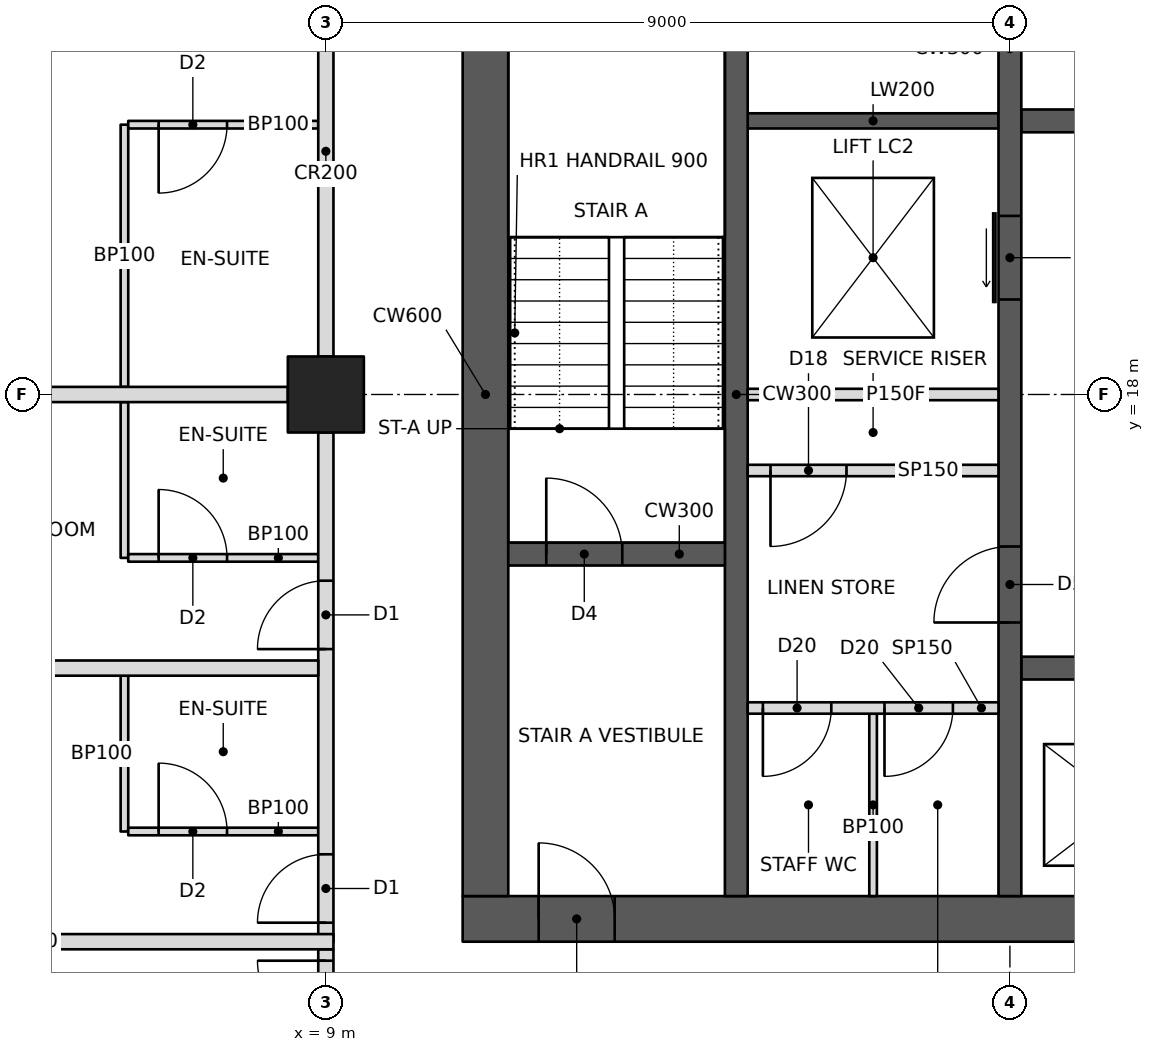
"""IFC4 building model, lengths in metres.
Left out: names, types, materials, properties, quantities, classifications, styles, units other than length and angle.
Written with IfcOpenShell. Run it as: python <this file> out.ifc"""

import sys

from ifc_helpers import new_model, si_unit, direction, frame, frame_2d, origin, origin_2d, place, context, subcontext, project, spatial, rectangle, hollow_rectangle, extrude, element, fill, save


model = new_model("IFC4")
c1 = context("Model", 3, precision=1e-05, world=origin(), true_north=direction((0.0, 1.0)))
c2 = subcontext(c1, "Body", "Model", "MODEL_VIEW")
j1 = project(units=[si_unit("LENGTHUNIT", "METRE"), si_unit("PLANEANGLEUNIT", "RADIAN")], contexts=[c1])
p1 = place(None, origin())
s1 = spatial("IfcSite", under=j1, at=p1, CompositionType="ELEMENT")
p2 = place(p1, origin())
s2 = spatial("IfcBuilding", under=s1, at=p2, CompositionType="ELEMENT")
p3 = place(p2, frame((0.0, 0.0, 163.8)))
s3 = spatial("IfcBuildingStorey", under=s2, at=p3, CompositionType="ELEMENT", Elevation=163.8)
p4 = place(p3, frame((9.0, 18.0, 0.0), z_axis=(0.0, 0.0, 1.0), x_axis=(1.0, 0.0, 0.0)))
e1 = element("IfcColumn", 1, at=p4, inside=s3, PredefinedType="COLUMN", context=c2, shape_type="SweptSolid", body=[
    extrude(hollow_rectangle(XDim=1.0, YDim=1.0, WallThickness=0.1, at=origin_2d()), origin(), (0.0, 0.0, 1.0), 3.4),
])
p5 = place(p3, frame((10.8, 11.1, 0.0), z_axis=(0.0, 0.0, 1.0), x_axis=(1.0, 0.0, 0.0)))
e2 = element("IfcWall", 2, at=p5, inside=s3, PredefinedType="SHEAR", context=c2, shape_type="SweptSolid", body=[
    extrude(rectangle(XDim=23.4, YDim=0.6, at=frame_2d((11.7, 0.0))), origin(), (0.0, 0.0, 1.0), 3.4),
])
p6 = place(p5, frame((1.0, 0.0, 0.0)))
e3 = element("IfcOpeningElement", 3, at=p6, cuts=e2, PredefinedType="OPENING", context=c2, shape_type="SweptSolid", body=[
    extrude(rectangle(XDim=1.0, YDim=2.1, at=frame_2d((0.5, 1.05))), frame((0.0, 0.31, 0.0), z_axis=(0.0, -1.0, 0.0), x_axis=(1.0, 0.0, 0.0)), (0.0, 0.0, 1.0), 0.62),
])
p7 = place(p5, frame((17.2, 0.0, 0.0)))
e4 = element("IfcOpeningElement", 4, at=p7, cuts=e2, PredefinedType="OPENING", context=c2, shape_type="SweptSolid", body=[
    extrude(rectangle(XDim=1.8, YDim=2.1, at=frame_2d((0.9, 1.05))), frame((0.0, 0.31, 0.0), z_axis=(0.0, -1.0, 0.0), x_axis=(1.0, 0.0, 0.0)), (0.0, 0.0, 1.0), 0.62),
])
p8 = place(p3, frame((11.1, 11.4, 0.0), z_axis=(0.0, 0.0, 1.0), x_axis=(0.0, 1.0, 0.0)))
e5 = element("IfcWall", 5, at=p8, inside=s3, PredefinedType="SHEAR", context=c2, shape_type="SweptSolid", body=[
    extrude(rectangle(XDim=13.2, YDim=0.6, at=frame_2d((6.6, 0.0))), origin(), (0.0, 0.0, 1.0), 3.4),
])
p9 = place(p3, frame((14.4, 11.4, 0.0), z_axis=(0.0, 0.0, 1.0), x_axis=(0.0, 1.0, 0.0)))
e6 = element("IfcWall", 6, at=p9, inside=s3, PredefinedType="SHEAR", context=c2, shape_type="SweptSolid", body=[
    extrude(rectangle(XDim=13.2, YDim=0.3, at=frame_2d((6.6, 0.0))), origin(), (0.0, 0.0, 1.0), 3.4),
])
p10 = place(p3, frame((11.4, 15.9, 0.0), z_axis=(0.0, 0.0, 1.0), x_axis=(1.0, 0.0, 0.0)))
e7 = element("IfcWall", 7, at=p10, inside=s3, PredefinedType="SHEAR", context=c2, shape_type="SweptSolid", body=[
    extrude(rectangle(XDim=2.85, YDim=0.3, at=frame_2d((1.425, 0.0))), origin(), (0.0, 0.0, 1.0), 3.4),
])
p11 = place(p10, frame((0.5, 0.0, 0.0)))
e8 = element("IfcOpeningElement", 8, at=p11, cuts=e7, PredefinedType="OPENING", context=c2, shape_type="SweptSolid", body=[
    extrude(rectangle(XDim=1.0, YDim=2.1, at=frame_2d((0.5, 1.05))), frame((0.0, 0.16, 0.0), z_axis=(0.0, -1.0, 0.0), x_axis=(1.0, 0.0, 0.0)), (0.0, 0.0, 1.0), 0.32),
])
p12 = place(p3, frame((18.0, 11.4, 0.0), z_axis=(0.0, 0.0, 1.0), x_axis=(0.0, 1.0, 0.0)))
e9 = element("IfcWall", 9, at=p12, inside=s3, PredefinedType="SHEAR", context=c2, shape_type="SweptSolid", body=[
    extrude(rectangle(XDim=13.2, YDim=0.3, at=frame_2d((6.6, 0.0))), origin(), (0.0, 0.0, 1.0), 3.4),
])
p13 = place(p12, frame((3.6, 0.0, 0.0)))
e10 = element("IfcOpeningElement", 10, at=p13, cuts=e9, PredefinedType="OPENING", context=c2, shape_type="SweptSolid", body=[
    extrude(rectangle(XDim=1.0, YDim=2.1, at=frame_2d((0.5, 1.05))), frame((0.0, 0.16, 0.0), z_axis=(0.0, -1.0, 0.0), x_axis=(1.0, 0.0, 0.0)), (0.0, 0.0, 1.0), 0.32),
])
p14 = place(p12, frame((7.85, 0.0, 0.0)))
e11 = element("IfcOpeningElement", 11, at=p14, cuts=e9, PredefinedType="OPENING", context=c2, shape_type="SweptSolid", body=[
    extrude(rectangle(XDim=1.1, YDim=2.1, at=frame_2d((0.55, 1.05))), frame((0.0, 0.16, 0.0), z_axis=(0.0, -1.0, 0.0), x_axis=(1.0, 0.0, 0.0)), (0.0, 0.0, 1.0), 0.32),
])
p15 = place(p3, frame((14.55, 18.0, 0.0), z_axis=(0.0, 0.0, 1.0), x_axis=(1.0, 0.0, 0.0)))
e12 = element("IfcWall", 12, at=p15, inside=s3, PredefinedType="PARTITIONING", context=c2, shape_type="SweptSolid", body=[
    extrude(rectangle(XDim=3.3, YDim=0.15, at=frame_2d((1.65, 0.0))), origin(), (0.0, 0.0, 1.0), 3.2),
])
p16 = place(p3, frame((18.15, 14.4, 0.0), z_axis=(0.0, 0.0, 1.0), x_axis=(1.0, 0.0, 0.0)))
e13 = element("IfcWall", 13, at=p16, inside=s3, PredefinedType="SHEAR", context=c2, shape_type="SweptSolid", body=[
    extrude(rectangle(XDim=9.0, YDim=0.3, at=frame_2d((4.5, 0.0))), origin(), (0.0, 0.0, 1.0), 3.4),
])
p17 = place(p16, frame((0.8, 0.0, 0.0)))
e14 = element("IfcOpeningElement", 14, at=p17, cuts=e13, PredefinedType="OPENING", context=c2, shape_type="SweptSolid", body=[
    extrude(rectangle(XDim=1.1, YDim=2.1, at=frame_2d((0.55, 1.05))), frame((0.0, 0.16, 0.0), z_axis=(0.0, -1.0, 0.0), x_axis=(1.0, 0.0, 0.0)), (0.0, 0.0, 1.0), 0.32),
])
p18 = place(p16, frame((6.75, 0.0, 0.0)))
e15 = element("IfcOpeningElement", 15, at=p18, cuts=e13, PredefinedType="OPENING", context=c2, shape_type="SweptSolid", body=[
    extrude(rectangle(XDim=1.2, YDim=2.1, at=frame_2d((0.6, 1.05))), frame((0.0, 0.16, 0.0), z_axis=(0.0, -1.0, 0.0), x_axis=(1.0, 0.0, 0.0)), (0.0, 0.0, 1.0), 0.32),
])
p19 = place(p16, frame((3.8, 0.0, 0.0)))
e16 = element("IfcOpeningElement", 16, at=p19, cuts=e13, PredefinedType="OPENING", context=c2, shape_type="SweptSolid", body=[
    extrude(rectangle(XDim=1.1, YDim=2.1, at=frame_2d((0.55, 1.05))), frame((0.0, 0.16, 0.0), z_axis=(0.0, -1.0, 0.0), x_axis=(1.0, 0.0, 0.0)), (0.0, 0.0, 1.0), 0.32),
])
p20 = place(p3, frame((18.15, 21.6, 0.0), z_axis=(0.0, 0.0, 1.0), x_axis=(1.0, 0.0, 0.0)))
e17 = element("IfcWall", 17, at=p20, inside=s3, PredefinedType="SHEAR", context=c2, shape_type="SweptSolid", body=[
    extrude(rectangle(XDim=9.0, YDim=0.3, at=frame_2d((4.5, 0.0))), origin(), (0.0, 0.0, 1.0), 3.4),
])
p21 = place(p20, frame((6.75, 0.0, 0.0)))
e18 = element("IfcOpeningElement", 18, at=p21, cuts=e17, PredefinedType="OPENING", context=c2, shape_type="SweptSolid", body=[
    extrude(rectangle(XDim=1.2, YDim=2.1, at=frame_2d((0.6, 1.05))), frame((0.0, 0.16, 0.0), z_axis=(0.0, -1.0, 0.0), x_axis=(1.0, 0.0, 0.0)), (0.0, 0.0, 1.0), 0.32),
])
p22 = place(p3, frame((14.55, 21.6, 0.0), z_axis=(0.0, 0.0, 1.0), x_axis=(1.0, 0.0, 0.0)))
e19 = element("IfcWall", 19, at=p22, inside=s3, PredefinedType="SHEAR", context=c2, shape_type="SweptSolid", body=[
    extrude(rectangle(XDim=3.3, YDim=0.2, at=frame_2d((1.65, 0.0))), origin(), (0.0, 0.0, 1.0), 3.4),
])
p23 = place(p3, frame((9.0, 10.8, 0.0), z_axis=(0.0, 0.0, 1.0), x_axis=(0.0, 1.0, 0.0)))
e20 = element("IfcWall", 20, at=p23, inside=s3, PredefinedType="PARTITIONING", context=c2, shape_type="SweptSolid", body=[
    extrude(rectangle(XDim=6.7, YDim=0.2, at=frame_2d((3.35, 0.0))), origin(), (0.0, 0.0, 1.0), 2.405),
])
p24 = place(p23, frame((0.25, 0.0, 0.0)))
e21 = element("IfcOpeningElement", 21, at=p24, cuts=e20, PredefinedType="OPENING", context=c2, shape_type="SweptSolid", body=[
    extrude(rectangle(XDim=0.9, YDim=2.1, at=frame_2d((0.45, 1.05))), frame((0.0, 0.11, 0.0), z_axis=(0.0, -1.0, 0.0), x_axis=(1.0, 0.0, 0.0)), (0.0, 0.0, 1.0), 0.22),
])
p25 = place(p23, frame((3.85, 0.0, 0.0)))
e22 = element("IfcOpeningElement", 22, at=p25, cuts=e20, PredefinedType="OPENING", context=c2, shape_type="SweptSolid", body=[
    extrude(rectangle(XDim=0.9, YDim=2.1, at=frame_2d((0.45, 1.05))), frame((0.0, 0.11, 0.0), z_axis=(0.0, -1.0, 0.0), x_axis=(1.0, 0.0, 0.0)), (0.0, 0.0, 1.0), 0.22),
])
p26 = place(p3, frame((9.0, 18.5, 0.0), z_axis=(0.0, 0.0, 1.0), x_axis=(0.0, 1.0, 0.0)))
e23 = element("IfcWall", 23, at=p26, inside=s3, PredefinedType="PARTITIONING", context=c2, shape_type="SweptSolid", body=[
    extrude(rectangle(XDim=8.1, YDim=0.2, at=frame_2d((4.05, 0.0))), origin(), (0.0, 0.0, 1.0), 2.405),
])
p27 = place(p26, frame((5.55, 0.0, 0.0)))
e24 = element("IfcOpeningElement", 24, at=p27, cuts=e23, PredefinedType="OPENING", context=c2, shape_type="SweptSolid", body=[
    extrude(rectangle(XDim=0.9, YDim=2.1, at=frame_2d((0.45, 1.05))), frame((0.0, 0.11, 0.0), z_axis=(0.0, -1.0, 0.0), x_axis=(1.0, 0.0, 0.0)), (0.0, 0.0, 1.0), 0.22),
])
p28 = place(p3, frame((1.0, 10.8, 0.0), z_axis=(0.0, 0.0, 1.0), x_axis=(1.0, 0.0, 0.0)))
e25 = element("IfcWall", 25, at=p28, inside=s3, PredefinedType="PARTITIONING", context=c2, shape_type="SweptSolid", body=[
    extrude(rectangle(XDim=8.1, YDim=0.2, at=frame_2d((4.05, 0.0))), origin(), (0.0, 0.0, 1.0), 2.404),
])
p29 = place(p3, frame((8.9, 14.4, 0.0), z_axis=(0.0, 0.0, 1.0), x_axis=(-1.0, 0.0, 0.0)))
e26 = element("IfcWall", 26, at=p29, inside=s3, PredefinedType="PARTITIONING", context=c2, shape_type="SweptSolid", body=[
    extrude(rectangle(XDim=7.9, YDim=0.2, at=frame_2d((3.95, 0.0))), origin(), (0.0, 0.0, 1.0), 2.404),
])
p30 = place(p3, frame((8.5, 18.0, 0.0), z_axis=(0.0, 0.0, 1.0), x_axis=(-1.0, 0.0, 0.0)))
e27 = element("IfcWall", 27, at=p30, inside=s3, PredefinedType="PARTITIONING", context=c2, shape_type="SweptSolid", body=[
    extrude(rectangle(XDim=7.5, YDim=0.2, at=frame_2d((3.75, 0.0))), origin(), (0.0, 0.0, 1.0), 2.405),
])
p31 = place(p3, frame((6.35, 12.25, 0.0), z_axis=(0.0, 0.0, 1.0), x_axis=(0.0, 1.0, 0.0)))
e28 = element("IfcWall", 28, at=p31, inside=s3, PredefinedType="PARTITIONING", context=c2, shape_type="SweptSolid", body=[
    extrude(rectangle(XDim=2.05, YDim=0.1, at=frame_2d((1.025, 0.0))), origin(), (0.0, 0.0, 1.0), 3.2),
])
p32 = place(p3, frame((8.9, 12.25, 0.0), z_axis=(0.0, 0.0, 1.0), x_axis=(-1.0, 0.0, 0.0)))
e29 = element("IfcWall", 29, at=p32, inside=s3, PredefinedType="PARTITIONING", context=c2, shape_type="SweptSolid", body=[
    extrude(rectangle(XDim=2.5, YDim=0.1, at=frame_2d((1.25, 0.0))), origin(), (0.0, 0.0, 1.0), 2.404),
])
p33 = place(p32, frame((1.2, 0.0, 0.0)))
e30 = element("IfcOpeningElement", 30, at=p33, cuts=e29, PredefinedType="OPENING", context=c2, shape_type="SweptSolid", body=[
    extrude(rectangle(XDim=0.9, YDim=2.1, at=frame_2d((0.45, 1.05))), frame((0.0, 0.06, 0.0), z_axis=(0.0, -1.0, 0.0), x_axis=(1.0, 0.0, 0.0)), (0.0, 0.0, 1.0), 0.12),
])
p34 = place(p3, frame((6.35, 15.85, 0.0), z_axis=(0.0, 0.0, 1.0), x_axis=(0.0, 1.0, 0.0)))
e31 = element("IfcWall", 31, at=p34, inside=s3, PredefinedType="PARTITIONING", context=c2, shape_type="SweptSolid", body=[
    extrude(rectangle(XDim=2.05, YDim=0.1, at=frame_2d((1.025, 0.0))), origin(), (0.0, 0.0, 1.0), 2.404),
])
p35 = place(p3, frame((8.9, 15.85, 0.0), z_axis=(0.0, 0.0, 1.0), x_axis=(-1.0, 0.0, 0.0)))
e32 = element("IfcWall", 32, at=p35, inside=s3, PredefinedType="PARTITIONING", context=c2, shape_type="SweptSolid", body=[
    extrude(rectangle(XDim=2.5, YDim=0.1, at=frame_2d((1.25, 0.0))), origin(), (0.0, 0.0, 1.0), 2.404),
])
p36 = place(p35, frame((1.2, 0.0, 0.0)))
e33 = element("IfcOpeningElement", 33, at=p36, cuts=e32, PredefinedType="OPENING", context=c2, shape_type="SweptSolid", body=[
    extrude(rectangle(XDim=0.9, YDim=2.1, at=frame_2d((0.45, 1.05))), frame((0.0, 0.06, 0.0), z_axis=(0.0, -1.0, 0.0), x_axis=(1.0, 0.0, 0.0)), (0.0, 0.0, 1.0), 0.12),
])
p37 = place(p3, frame((6.35, 18.1, 0.0), z_axis=(0.0, 0.0, 1.0), x_axis=(0.0, 1.0, 0.0)))
e34 = element("IfcWall", 34, at=p37, inside=s3, PredefinedType="PARTITIONING", context=c2, shape_type="SweptSolid", body=[
    extrude(rectangle(XDim=3.45, YDim=0.1, at=frame_2d((1.725, 0.0))), origin(), (0.0, 0.0, 1.0), 2.404),
])
p38 = place(p3, frame((8.9, 21.55, 0.0), z_axis=(0.0, 0.0, 1.0), x_axis=(-1.0, 0.0, 0.0)))
e35 = element("IfcWall", 35, at=p38, inside=s3, PredefinedType="PARTITIONING", context=c2, shape_type="SweptSolid", body=[
    extrude(rectangle(XDim=2.5, YDim=0.1, at=frame_2d((1.25, 0.0))), origin(), (0.0, 0.0, 1.0), 2.404),
])
p39 = place(p38, frame((1.2, 0.0, 0.0)))
e36 = element("IfcOpeningElement", 36, at=p39, cuts=e35, PredefinedType="OPENING", context=c2, shape_type="SweptSolid", body=[
    extrude(rectangle(XDim=0.9, YDim=2.1, at=frame_2d((0.45, 1.05))), frame((0.0, 0.06, 0.0), z_axis=(0.0, -1.0, 0.0), x_axis=(1.0, 0.0, 0.0)), (0.0, 0.0, 1.0), 0.12),
])
p40 = place(p3, frame((9.0, 9.5, 0.0), z_axis=(0.0, 0.0, 1.0), x_axis=(0.0, 1.0, 0.0)))
e37 = element("IfcWall", 37, at=p40, inside=s3, PredefinedType="PARTITIONING", context=c2, shape_type="SweptSolid", body=[
    extrude(rectangle(XDim=1.2, YDim=0.2, at=frame_2d((0.6, 0.0))), origin(), (0.0, 0.0, 1.0), 2.405),
])
p41 = place(p40, frame((0.15, 0.0, 0.0)))
e38 = element("IfcOpeningElement", 38, at=p41, cuts=e37, PredefinedType="OPENING", context=c2, shape_type="SweptSolid", body=[
    extrude(rectangle(XDim=0.9, YDim=2.1, at=frame_2d((0.45, 1.05))), frame((0.0, 0.11, 0.0), z_axis=(0.0, -1.0, 0.0), x_axis=(1.0, 0.0, 0.0)), (0.0, 0.0, 1.0), 0.22),
])
p42 = place(p3, frame((14.55, 17.0, 0.0), z_axis=(0.0, 0.0, 1.0), x_axis=(1.0, 0.0, 0.0)))
e39 = element("IfcWall", 39, at=p42, inside=s3, PredefinedType="PARTITIONING", context=c2, shape_type="SweptSolid", body=[
    extrude(rectangle(XDim=3.3, YDim=0.15, at=frame_2d((1.65, 0.0))), origin(), (0.0, 0.0, 1.0), 3.2),
])
p43 = place(p42, frame((0.3, 0.0, 0.0)))
e40 = element("IfcOpeningElement", 40, at=p43, cuts=e39, PredefinedType="OPENING", context=c2, shape_type="SweptSolid", body=[
    extrude(rectangle(XDim=1.0, YDim=2.1, at=frame_2d((0.5, 1.05))), frame((0.0, 0.085, 0.0), z_axis=(0.0, -1.0, 0.0), x_axis=(1.0, 0.0, 0.0)), (0.0, 0.0, 1.0), 0.17),
])
p44 = place(p3, frame((14.55, 13.875, 0.0), z_axis=(0.0, 0.0, 1.0), x_axis=(1.0, 0.0, 0.0)))
e41 = element("IfcWall", 41, at=p44, inside=s3, PredefinedType="PARTITIONING", context=c2, shape_type="SweptSolid", body=[
    extrude(rectangle(XDim=3.3, YDim=0.15, at=frame_2d((1.65, 0.0))), origin(), (0.0, 0.0, 1.0), 3.2),
])
p45 = place(p44, frame((0.2, 0.0, 0.0)))
e42 = element("IfcOpeningElement", 42, at=p45, cuts=e41, PredefinedType="OPENING", context=c2, shape_type="SweptSolid", body=[
    extrude(rectangle(XDim=0.9, YDim=2.1, at=frame_2d((0.45, 1.05))), frame((0.0, 0.085, 0.0), z_axis=(0.0, -1.0, 0.0), x_axis=(1.0, 0.0, 0.0)), (0.0, 0.0, 1.0), 0.17),
])
p46 = place(p44, frame((1.8, 0.0, 0.0)))
e43 = element("IfcOpeningElement", 43, at=p46, cuts=e41, PredefinedType="OPENING", context=c2, shape_type="SweptSolid", body=[
    extrude(rectangle(XDim=0.9, YDim=2.1, at=frame_2d((0.45, 1.05))), frame((0.0, 0.085, 0.0), z_axis=(0.0, -1.0, 0.0), x_axis=(1.0, 0.0, 0.0)), (0.0, 0.0, 1.0), 0.17),
])
p47 = place(p3, frame((16.2, 11.4, 0.0), z_axis=(0.0, 0.0, 1.0), x_axis=(0.0, 1.0, 0.0)))
e44 = element("IfcWall", 44, at=p47, inside=s3, PredefinedType="PARTITIONING", context=c2, shape_type="SweptSolid", body=[
    extrude(rectangle(XDim=2.4, YDim=0.1, at=frame_2d((1.2, 0.0))), origin(), (0.0, 0.0, 1.0), 3.2),
])
p48 = place(p33, frame((0.9, 0.0, 0.0), z_axis=(0.0, 0.0, 1.0), x_axis=(-1.0, 0.0, 0.0)))
e45 = element("IfcDoor", 45, at=p48, inside=s3, OperationType="SINGLE_SWING_LEFT", PredefinedType="DOOR", context=c2, shape_type="SweptSolid", body=[
    extrude(rectangle(XDim=0.9, YDim=2.1, at=frame_2d((0.45, 1.05))), frame((0.0, 0.025, 0.0), z_axis=(0.0, -1.0, 0.0), x_axis=(1.0, 0.0, 0.0)), (0.0, 0.0, 1.0), 0.05),
])
fill(e30, e45)
p49 = place(p24, origin())
e46 = element("IfcDoor", 46, at=p49, inside=s3, OperationType="SINGLE_SWING_LEFT", PredefinedType="DOOR", context=c2, shape_type="SweptSolid", body=[
    extrude(rectangle(XDim=0.9, YDim=2.1, at=frame_2d((0.45, 1.05))), frame((0.0, 0.025, 0.0), z_axis=(0.0, -1.0, 0.0), x_axis=(1.0, 0.0, 0.0)), (0.0, 0.0, 1.0), 0.05),
])
fill(e21, e46)
p50 = place(p36, frame((0.9, 0.0, 0.0), z_axis=(0.0, 0.0, 1.0), x_axis=(-1.0, 0.0, 0.0)))
e47 = element("IfcDoor", 47, at=p50, inside=s3, OperationType="SINGLE_SWING_LEFT", PredefinedType="DOOR", context=c2, shape_type="SweptSolid", body=[
    extrude(rectangle(XDim=0.9, YDim=2.1, at=frame_2d((0.45, 1.05))), frame((0.0, 0.025, 0.0), z_axis=(0.0, -1.0, 0.0), x_axis=(1.0, 0.0, 0.0)), (0.0, 0.0, 1.0), 0.05),
])
fill(e33, e47)
p51 = place(p25, origin())
e48 = element("IfcDoor", 48, at=p51, inside=s3, OperationType="SINGLE_SWING_LEFT", PredefinedType="DOOR", context=c2, shape_type="SweptSolid", body=[
    extrude(rectangle(XDim=0.9, YDim=2.1, at=frame_2d((0.45, 1.05))), frame((0.0, 0.025, 0.0), z_axis=(0.0, -1.0, 0.0), x_axis=(1.0, 0.0, 0.0)), (0.0, 0.0, 1.0), 0.05),
])
fill(e22, e48)
p52 = place(p39, origin())
e49 = element("IfcDoor", 49, at=p52, inside=s3, OperationType="SINGLE_SWING_RIGHT", PredefinedType="DOOR", context=c2, shape_type="SweptSolid", body=[
    extrude(rectangle(XDim=0.9, YDim=2.1, at=frame_2d((0.45, 1.05))), frame((0.0, 0.025, 0.0), z_axis=(0.0, -1.0, 0.0), x_axis=(1.0, 0.0, 0.0)), (0.0, 0.0, 1.0), 0.05),
])
fill(e36, e49)
p53 = place(p41, origin())
e50 = element("IfcDoor", 50, at=p53, inside=s3, OperationType="SINGLE_SWING_RIGHT", PredefinedType="DOOR", context=c2, shape_type="SweptSolid", body=[
    extrude(rectangle(XDim=0.9, YDim=2.1, at=frame_2d((0.45, 1.05))), frame((0.0, 0.025, 0.0), z_axis=(0.0, -1.0, 0.0), x_axis=(1.0, 0.0, 0.0)), (0.0, 0.0, 1.0), 0.05),
])
fill(e38, e50)
p54 = place(p43, frame((1.0, 0.0, 0.0), z_axis=(0.0, 0.0, 1.0), x_axis=(-1.0, 0.0, 0.0)))
e51 = element("IfcDoor", 51, at=p54, inside=s3, OperationType="SINGLE_SWING_RIGHT", PredefinedType="DOOR", context=c2, shape_type="SweptSolid", body=[
    extrude(rectangle(XDim=1.0, YDim=2.1, at=frame_2d((0.5, 1.05))), frame((0.0, 0.025, 0.0), z_axis=(0.0, -1.0, 0.0), x_axis=(1.0, 0.0, 0.0)), (0.0, 0.0, 1.0), 0.05),
])
fill(e40, e51)
p55 = place(p45, frame((0.9, 0.0, 0.0), z_axis=(0.0, 0.0, 1.0), x_axis=(-1.0, 0.0, 0.0)))
e52 = element("IfcDoor", 52, at=p55, inside=s3, OperationType="SINGLE_SWING_RIGHT", PredefinedType="DOOR", context=c2, shape_type="SweptSolid", body=[
    extrude(rectangle(XDim=0.9, YDim=2.1, at=frame_2d((0.45, 1.05))), frame((0.0, 0.025, 0.0), z_axis=(0.0, -1.0, 0.0), x_axis=(1.0, 0.0, 0.0)), (0.0, 0.0, 1.0), 0.05),
])
fill(e42, e52)
p56 = place(p46, frame((0.9, 0.0, 0.0), z_axis=(0.0, 0.0, 1.0), x_axis=(-1.0, 0.0, 0.0)))
e53 = element("IfcDoor", 53, at=p56, inside=s3, OperationType="SINGLE_SWING_RIGHT", PredefinedType="DOOR", context=c2, shape_type="SweptSolid", body=[
    extrude(rectangle(XDim=0.9, YDim=2.1, at=frame_2d((0.45, 1.05))), frame((0.0, 0.025, 0.0), z_axis=(0.0, -1.0, 0.0), x_axis=(1.0, 0.0, 0.0)), (0.0, 0.0, 1.0), 0.05),
])
fill(e43, e53)
p57 = place(p6, origin())
e54 = element("IfcDoor", 54, at=p57, inside=s3, OperationType="SINGLE_SWING_LEFT", PredefinedType="DOOR", context=c2, shape_type="SweptSolid", body=[
    extrude(rectangle(XDim=1.0, YDim=2.1, at=frame_2d((0.5, 1.05))), frame((0.0, 0.025, 0.0), z_axis=(0.0, -1.0, 0.0), x_axis=(1.0, 0.0, 0.0)), (0.0, 0.0, 1.0), 0.05),
])
fill(e3, e54)
p58 = place(p11, origin())
e55 = element("IfcDoor", 55, at=p58, inside=s3, OperationType="SINGLE_SWING_LEFT", PredefinedType="DOOR", context=c2, shape_type="SweptSolid", body=[
    extrude(rectangle(XDim=1.0, YDim=2.1, at=frame_2d((0.5, 1.05))), frame((0.0, 0.025, 0.0), z_axis=(0.0, -1.0, 0.0), x_axis=(1.0, 0.0, 0.0)), (0.0, 0.0, 1.0), 0.05),
])
fill(e8, e55)
p59 = place(p13, origin())
e56 = element("IfcDoor", 56, at=p59, inside=s3, OperationType="SINGLE_SWING_LEFT", PredefinedType="DOOR", context=c2, shape_type="SweptSolid", body=[
    extrude(rectangle(XDim=1.0, YDim=2.1, at=frame_2d((0.5, 1.05))), frame((0.0, 0.025, 0.0), z_axis=(0.0, -1.0, 0.0), x_axis=(1.0, 0.0, 0.0)), (0.0, 0.0, 1.0), 0.05),
])
fill(e10, e56)
p60 = place(p14, origin())
e57 = element("IfcDoor", 57, at=p60, inside=s3, OperationType="SLIDING_TO_LEFT", PredefinedType="DOOR", context=c2, shape_type="SweptSolid", body=[
    extrude(rectangle(XDim=1.1, YDim=2.1, at=frame_2d((0.55, 1.05))), frame((0.0, 0.025, 0.0), z_axis=(0.0, -1.0, 0.0), x_axis=(1.0, 0.0, 0.0)), (0.0, 0.0, 1.0), 0.05),
])
fill(e11, e57)
save(model, sys.argv[1])
